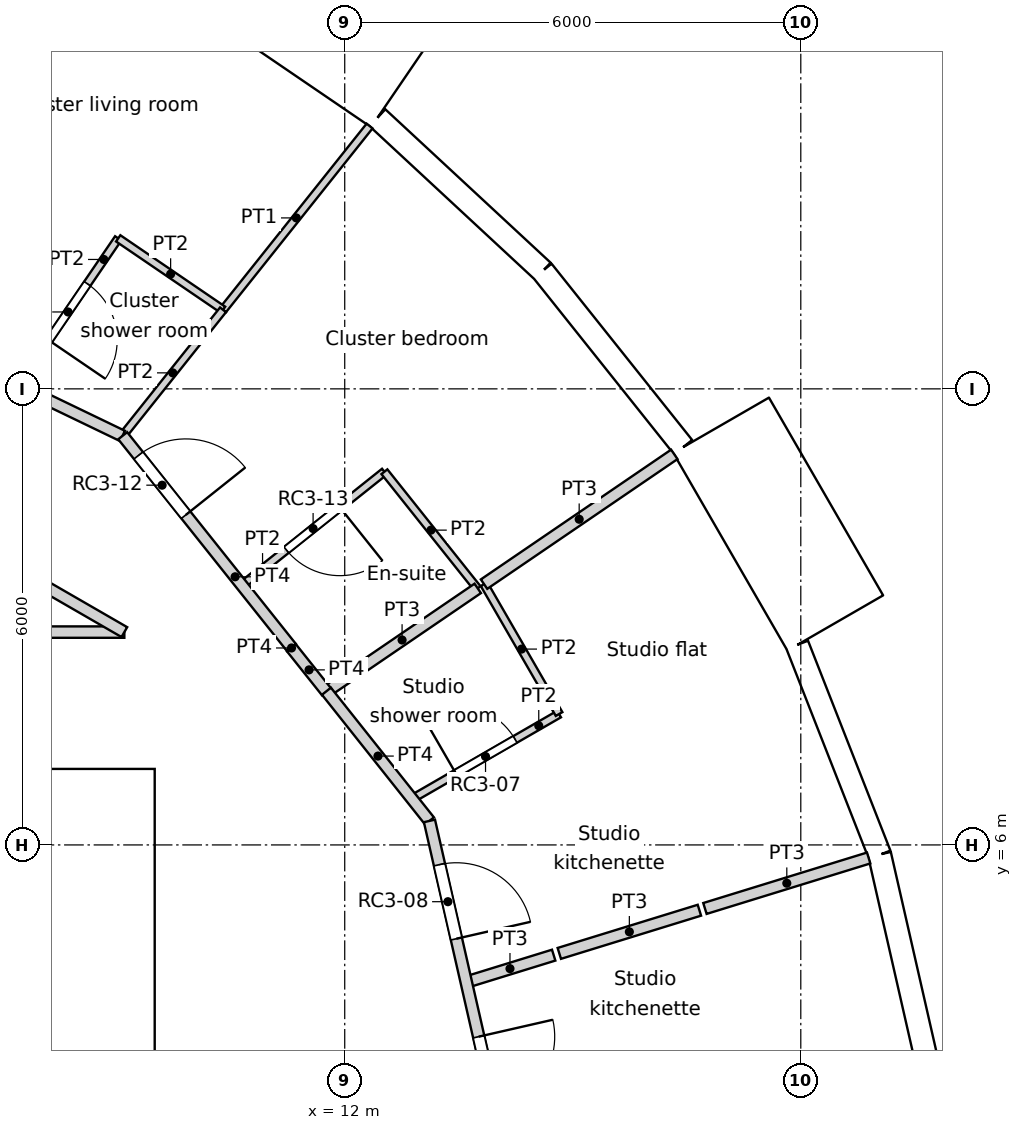
"""IFC4 building model, lengths in metres.
Left out: names, types, materials, properties, quantities, classifications, styles, units other than length and angle.
Written with IfcOpenShell. Run it as: python <this file> out.ifc"""

import sys

from ifc_helpers import new_model, si_unit, direction, frame, frame_2d, origin, origin_2d, place, context, subcontext, project, spatial, rectangle, circle, extrude, element, fill, save


model = new_model("IFC4")
c1 = context("Model", 3, precision=1e-05, world=origin(), true_north=direction((0.0, 1.0)))
c2 = subcontext(c1, "Body", "Model", "MODEL_VIEW")
j1 = project(units=[si_unit("LENGTHUNIT", "METRE"), si_unit("PLANEANGLEUNIT", "RADIAN")], contexts=[c1])
p1 = place(None, origin())
s1 = spatial("IfcSite", under=j1, at=p1, CompositionType="ELEMENT")
p2 = place(p1, origin())
s2 = spatial("IfcBuilding", under=s1, at=p2, CompositionType="ELEMENT")
p3 = place(p2, frame((0.0, 0.0, 252.6)))
s3 = spatial("IfcBuildingStorey", under=s2, at=p3, CompositionType="ELEMENT", Elevation=252.6)
for number, where, z_axis, x_axis in (
    (1, (17.986, 5.548, 0.0), (0.0, 0.0, 1.0), (1.0, 0.0, 0.0)),
    (2, (15.552, 10.603, 0.0), (0.0, 0.0, 1.0), (1.0, 0.0, 0.0)),
    (3, (11.735, 14.716, 0.0), (0.0, 0.0, 1.0), (1.0, 0.0, 0.0)),
):
    element("IfcColumn", number, at=place(p3, frame(where, z_axis=z_axis, x_axis=x_axis)), inside=s3, PredefinedType="COLUMN", context=c2, shape_type="SweptSolid", body=[
        extrude(circle(Radius=0.55, at=origin_2d()), origin(), (0.0, 0.0, 1.0), 3.6),
    ])
p4 = place(p3, frame((19.696, 2.984, 0.0), z_axis=(0.0, 0.0, 1.0), x_axis=(-0.222529389789, 0.974925982155, 0.0)))
e4 = element("IfcWall", 4, at=p4, inside=s3, PredefinedType="SOLIDWALL", context=c2, shape_type="SweptSolid", body=[
    extrude(rectangle(XDim=2.962, YDim=0.3, at=frame_2d((1.481, 0.0))), origin(), (0.0, 0.0, 1.0), 3.25),
])
p5 = place(p4, frame((1.481, 0.0, 1.55)))
e5 = element("IfcOpeningElement", 5, at=p5, cuts=e4, PredefinedType="OPENING", context=c2, shape_type="SweptSolid", body=[
    extrude(circle(Radius=0.9, at=origin_2d()), frame((0.0, 0.16, 0.0), z_axis=(0.0, -1.0, 0.0), x_axis=(1.0, 0.0, 0.0)), (0.0, 0.0, 1.0), 0.32),
])
p6 = place(p3, frame((19.037, 5.872, 0.0), z_axis=(0.0, 0.0, 1.0), x_axis=(-0.36530043032, 0.930889679612, 0.0)))
e6 = element("IfcWall", 6, at=p6, inside=s3, PredefinedType="SOLIDWALL", context=c2, shape_type="SweptSolid", body=[
    extrude(rectangle(XDim=2.962, YDim=0.3, at=frame_2d((1.481, 0.0))), origin(), (0.0, 0.0, 1.0), 3.25),
])
p7 = place(p6, frame((1.481, 0.0, 1.55)))
e7 = element("IfcOpeningElement", 7, at=p7, cuts=e6, PredefinedType="OPENING", context=c2, shape_type="SweptSolid", body=[
    extrude(circle(Radius=0.9, at=origin_2d()), frame((0.0, 0.16, 0.0), z_axis=(0.0, -1.0, 0.0), x_axis=(1.0, 0.0, 0.0)), (0.0, 0.0, 1.0), 0.32),
])
p8 = place(p3, frame((18.452, 8.921, -0.35), z_axis=(0.0, 0.0, 1.0), x_axis=(-0.499990139034, 0.866031096941, 0.0)))
e8 = element("IfcWall", 8, at=p8, inside=s3, PredefinedType="ELEMENTEDWALL", context=c2, shape_type="SweptSolid", body=[
    extrude(rectangle(XDim=3.0, YDim=1.45, at=frame_2d((1.5, 0.0))), origin(), (0.0, 0.0, 1.0), 3.6),
])
p9 = place(p8, frame((1.5, 0.0, 1.9)))
e9 = element("IfcOpeningElement", 9, at=p9, cuts=e8, PredefinedType="OPENING", context=c2, shape_type="SweptSolid", body=[
    extrude(circle(Radius=0.9, at=origin_2d()), frame((0.0, 0.735, 0.0), z_axis=(0.0, -1.0, 0.0), x_axis=(1.0, 0.0, 0.0)), (0.0, 0.0, 1.0), 1.47),
])
p10 = place(p3, frame((16.451, 11.234, 0.0), z_axis=(0.0, 0.0, 1.0), x_axis=(-0.623498236992, 0.781824755599, 0.0)))
e10 = element("IfcWall", 10, at=p10, inside=s3, PredefinedType="SOLIDWALL", context=c2, shape_type="SweptSolid", body=[
    extrude(rectangle(XDim=2.962, YDim=0.3, at=frame_2d((1.481, 0.0))), origin(), (0.0, 0.0, 1.0), 3.25),
])
p11 = place(p10, frame((1.481, 0.0, 1.55)))
e11 = element("IfcOpeningElement", 11, at=p11, cuts=e10, PredefinedType="OPENING", context=c2, shape_type="SweptSolid", body=[
    extrude(circle(Radius=0.9, at=origin_2d()), frame((0.0, 0.16, 0.0), z_axis=(0.0, -1.0, 0.0), x_axis=(1.0, 0.0, 0.0)), (0.0, 0.0, 1.0), 0.32),
])
p12 = place(p3, frame((14.604, 13.55, 0.0), z_axis=(0.0, 0.0, 1.0), x_axis=(-0.733066412643, 0.680157066165, 0.0)))
e12 = element("IfcWall", 12, at=p12, inside=s3, PredefinedType="SOLIDWALL", context=c2, shape_type="SweptSolid", body=[
    extrude(rectangle(XDim=2.962, YDim=0.3, at=frame_2d((1.481, 0.0))), origin(), (0.0, 0.0, 1.0), 3.25),
])
p13 = place(p12, frame((1.481, 0.0, 1.55)))
e13 = element("IfcOpeningElement", 13, at=p13, cuts=e12, PredefinedType="OPENING", context=c2, shape_type="SweptSolid", body=[
    extrude(circle(Radius=0.9, at=origin_2d()), frame((0.0, 0.16, 0.0), z_axis=(0.0, -1.0, 0.0), x_axis=(1.0, 0.0, 0.0)), (0.0, 0.0, 1.0), 0.32),
])
p14 = place(p3, frame((12.754, 16.044, -0.35), z_axis=(0.0, 0.0, 1.0), x_axis=(-0.826246281157, 0.563309047392, 0.0)))
e14 = element("IfcWall", 14, at=p14, inside=s3, PredefinedType="ELEMENTEDWALL", context=c2, shape_type="SweptSolid", body=[
    extrude(rectangle(XDim=3.0, YDim=1.45, at=frame_2d((1.5, 0.0))), origin(), (0.0, 0.0, 1.0), 3.6),
])
p15 = place(p14, frame((1.5, 0.0, 1.9)))
e15 = element("IfcOpeningElement", 15, at=p15, cuts=e14, PredefinedType="OPENING", context=c2, shape_type="SweptSolid", body=[
    extrude(circle(Radius=0.9, at=origin_2d()), frame((0.0, 0.735, 0.0), z_axis=(0.0, -1.0, 0.0), x_axis=(1.0, 0.0, 0.0)), (0.0, 0.0, 1.0), 1.47),
])
p16 = place(p3, frame((-9.5, 6.7, 0.0), z_axis=(0.0, 0.0, 1.0), x_axis=(1.0, 0.0, 0.0)))
e16 = element("IfcWall", 16, at=p16, inside=s3, PredefinedType="SOLIDWALL", context=c2, shape_type="SweptSolid", body=[
    extrude(rectangle(XDim=19.0, YDim=0.6, at=frame_2d((9.5, 0.0))), origin(), (0.0, 0.0, 1.0), 3.6),
])
p17 = place(p16, frame((5.35, 0.0, 0.0)))
e17 = element("IfcOpeningElement", 17, at=p17, cuts=e16, PredefinedType="OPENING", context=c2, shape_type="SweptSolid", body=[
    extrude(rectangle(XDim=1.7, YDim=2.1, at=frame_2d((0.85, 1.05))), frame((0.0, 0.3, 0.0), z_axis=(0.0, -1.0, 0.0), x_axis=(1.0, 0.0, 0.0)), (0.0, 0.0, 1.0), 0.6),
])
p18 = place(p3, frame((9.2, -6.4, 0.0), z_axis=(0.0, 0.0, 1.0), x_axis=(0.0, 1.0, 0.0)))
e18 = element("IfcWall", 18, at=p18, inside=s3, PredefinedType="SOLIDWALL", context=c2, shape_type="SweptSolid", body=[
    extrude(rectangle(XDim=12.8, YDim=0.6, at=frame_2d((6.4, 0.0))), origin(), (0.0, 0.0, 1.0), 3.6),
])
p19 = place(p18, frame((6.4, 0.0, 0.0)))
e19 = element("IfcOpeningElement", 19, at=p19, cuts=e18, PredefinedType="OPENING", context=c2, shape_type="SweptSolid", body=[
    extrude(rectangle(XDim=1.8, YDim=2.1, at=frame_2d((0.9, 1.05))), frame((0.0, 0.3, 0.0), z_axis=(0.0, -1.0, 0.0), x_axis=(1.0, 0.0, 0.0)), (0.0, 0.0, 1.0), 0.6),
])
p20 = place(p3, frame((0.896, 8.8, 0.0), z_axis=(0.0, 0.0, 1.0), x_axis=(1.0, 0.0, 0.0)))
e20 = element("IfcWall", 20, at=p20, inside=s3, PredefinedType="PARTITIONING", context=c2, shape_type="SweptSolid", body=[
    extrude(rectangle(XDim=8.205, YDim=0.15, at=frame_2d((4.102, 0.0))), origin(), (0.0, 0.0, 1.0), 3.25),
])
p21 = place(p20, frame((3.598, 0.0, 0.0)))
e21 = element("IfcOpeningElement", 21, at=p21, cuts=e20, PredefinedType="OPENING", context=c2, shape_type="SweptSolid", body=[
    extrude(rectangle(XDim=1.0, YDim=2.04, at=frame_2d((0.5, 1.02))), frame((0.0, 0.075, 0.0), z_axis=(0.0, -1.0, 0.0), x_axis=(1.0, 0.0, 0.0)), (0.0, 0.0, 1.0), 0.15),
])
p22 = place(p3, frame((9.079, 11.384, 0.0), z_axis=(0.0, 0.0, 1.0), x_axis=(0.623165080354, -0.782090328944, 0.0)))
e22 = element("IfcWall", 22, at=p22, inside=s3, PredefinedType="PARTITIONING", context=c2, shape_type="SweptSolid", body=[
    extrude(rectangle(XDim=3.564, YDim=0.15, at=frame_2d((1.782, 0.0))), origin(), (0.0, 0.0, 1.0), 3.25),
])
p23 = place(p22, frame((0.332, 0.0, 0.0)))
e23 = element("IfcOpeningElement", 23, at=p23, cuts=e22, PredefinedType="OPENING", context=c2, shape_type="SweptSolid", body=[
    extrude(rectangle(XDim=1.0, YDim=2.1, at=frame_2d((0.5, 1.05))), frame((0.0, 0.075, 0.0), z_axis=(0.0, -1.0, 0.0), x_axis=(1.0, 0.0, 0.0)), (0.0, 0.0, 1.0), 0.15),
])
p24 = place(p3, frame((11.3, 8.586, 0.0), z_axis=(0.0, 0.0, 1.0), x_axis=(0.0, 1.0, 0.0)))
e24 = element("IfcWall", 24, at=p24, inside=s3, PredefinedType="PARTITIONING", context=c2, shape_type="SweptSolid", body=[
    extrude(rectangle(XDim=0.01, YDim=0.15, at=frame_2d((0.005, 0.0))), origin(), (0.0, 0.0, 1.0), 3.25),
])
p25 = place(p3, frame((13.115, 6.316, 0.0), z_axis=(0.0, 0.0, 1.0), x_axis=(0.222568978642, -0.97491694505, 0.0)))
e25 = element("IfcWall", 25, at=p25, inside=s3, PredefinedType="PARTITIONING", context=c2, shape_type="SweptSolid", body=[
    extrude(rectangle(XDim=6.479, YDim=0.15, at=frame_2d((3.239, 0.0))), origin(), (0.0, 0.0, 1.0), 3.25),
])
p26 = place(p25, frame((2.911, 0.0, 0.0)))
e26 = element("IfcOpeningElement", 26, at=p26, cuts=e25, PredefinedType="OPENING", context=c2, shape_type="SweptSolid", body=[
    extrude(rectangle(XDim=1.0, YDim=2.1, at=frame_2d((0.5, 1.05))), frame((0.0, 0.075, 0.0), z_axis=(0.0, -1.0, 0.0), x_axis=(1.0, 0.0, 0.0)), (0.0, 0.0, 1.0), 0.15),
])
p27 = place(p25, frame((0.59, 0.0, 0.0)))
e27 = element("IfcOpeningElement", 27, at=p27, cuts=e25, PredefinedType="OPENING", context=c2, shape_type="SweptSolid", body=[
    extrude(rectangle(XDim=1.0, YDim=2.1, at=frame_2d((0.5, 1.05))), frame((0.0, 0.075, 0.0), z_axis=(0.0, -1.0, 0.0), x_axis=(1.0, 0.0, 0.0)), (0.0, 0.0, 1.0), 0.15),
])
p28 = place(p3, frame((11.76, 8.022, 0.0), z_axis=(0.0, 0.0, 1.0), x_axis=(0.62206805366, -0.782963177049, 0.0)))
e28 = element("IfcWall", 28, at=p28, inside=s3, PredefinedType="PARTITIONING", context=c2, shape_type="SweptSolid", body=[
    extrude(rectangle(XDim=2.179, YDim=0.15, at=frame_2d((1.089, 0.0))), origin(), (0.0, 0.0, 1.0), 3.25),
])
p29 = place(p3, frame((11.3, 8.592, 0.0), z_axis=(0.0, 0.0, 1.0), x_axis=(0.623405636383, -0.781898594785, 0.0)))
e29 = element("IfcWall", 29, at=p29, inside=s3, PredefinedType="PARTITIONING", context=c2, shape_type="SweptSolid", body=[
    extrude(rectangle(XDim=0.74, YDim=0.15, at=frame_2d((0.37, 0.0))), origin(), (0.0, 0.0, 1.0), 3.25),
])
p30 = place(p3, frame((3.261, 12.171, 0.0), z_axis=(0.0, 0.0, 1.0), x_axis=(0.866066809554, -0.499928276245, 0.0)))
e30 = element("IfcWall", 30, at=p30, inside=s3, PredefinedType="PARTITIONING", context=c2, shape_type="SweptSolid", body=[
    extrude(rectangle(XDim=6.743, YDim=0.15, at=frame_2d((3.371, 0.0))), origin(), (0.0, 0.0, 1.0), 3.25),
])
p31 = place(p3, frame((3.239, 14.192, 0.0), z_axis=(0.0, 0.0, 1.0), x_axis=(0.90093183072, -0.433960639224, 0.0)))
e31 = element("IfcWall", 31, at=p31, inside=s3, PredefinedType="PARTITIONING", context=c2, shape_type="SweptSolid", body=[
    extrude(rectangle(XDim=6.479, YDim=0.15, at=frame_2d((3.239, 0.0))), origin(), (0.0, 0.0, 1.0), 3.25),
])
p32 = place(p31, frame((3.013, 0.0, 0.0)))
e32 = element("IfcOpeningElement", 32, at=p32, cuts=e31, PredefinedType="OPENING", context=c2, shape_type="SweptSolid", body=[
    extrude(rectangle(XDim=1.1, YDim=2.1, at=frame_2d((0.55, 1.05))), frame((0.0, 0.075, 0.0), z_axis=(0.0, -1.0, 0.0), x_axis=(1.0, 0.0, 0.0)), (0.0, 0.0, 1.0), 0.15),
])
p33 = place(p3, frame((13.599, 4.195, 0.0), z_axis=(0.0, 0.0, 1.0), x_axis=(0.955506647746, 0.294969568115, 0.0)))
e33 = element("IfcWall", 33, at=p33, inside=s3, PredefinedType="PARTITIONING", context=c2, shape_type="SweptSolid", body=[
    extrude(rectangle(XDim=1.203, YDim=0.15, at=frame_2d((0.602, 0.0))), origin(), (0.0, 0.0, 1.0), 3.25),
])
p34 = place(p3, frame((16.739, 5.164, 0.0), z_axis=(0.0, 0.0, 1.0), x_axis=(0.955650111791, 0.294504437715, 0.0)))
e34 = element("IfcWall", 34, at=p34, inside=s3, PredefinedType="PARTITIONING", context=c2, shape_type="SweptSolid", body=[
    extrude(rectangle(XDim=2.254, YDim=0.15, at=frame_2d((1.127, 0.0))), origin(), (0.0, 0.0, 1.0), 3.25),
])
p35 = place(p3, frame((14.823, 4.573, 0.0), z_axis=(0.0, 0.0, 1.0), x_axis=(0.955628343972, 0.294575063773, 0.0)))
e35 = element("IfcWall", 35, at=p35, inside=s3, PredefinedType="PARTITIONING", context=c2, shape_type="SweptSolid", body=[
    extrude(rectangle(XDim=1.929, YDim=0.15, at=frame_2d((0.964, 0.0))), origin(), (0.0, 0.0, 1.0), 3.25),
])
p36 = place(p3, frame((12.885, 6.605, 0.0), z_axis=(0.0, 0.0, 1.0), x_axis=(0.866076416361, 0.499911633214, 0.0)))
e36 = element("IfcWall", 36, at=p36, inside=s3, PredefinedType="PARTITIONING", context=c2, shape_type="SweptSolid", body=[
    extrude(rectangle(XDim=2.234, YDim=0.1, at=frame_2d((1.117, 0.0))), origin(), (0.0, 0.0, 1.0), 3.25),
])
p37 = place(p36, frame((0.667, 0.0, 0.0)))
e37 = element("IfcOpeningElement", 37, at=p37, cuts=e36, PredefinedType="OPENING", context=c2, shape_type="SweptSolid", body=[
    extrude(rectangle(XDim=0.9, YDim=2.04, at=frame_2d((0.45, 1.02))), frame((0.0, 0.05, 0.0), z_axis=(0.0, -1.0, 0.0), x_axis=(1.0, 0.0, 0.0)), (0.0, 0.0, 1.0), 0.1),
])
p38 = place(p3, frame((13.833, 9.431, 0.0), z_axis=(0.0, 0.0, 1.0), x_axis=(0.500143626598, -0.865942465048, 0.0)))
e38 = element("IfcWall", 38, at=p38, inside=s3, PredefinedType="PARTITIONING", context=c2, shape_type="SweptSolid", body=[
    extrude(rectangle(XDim=1.974, YDim=0.1, at=frame_2d((0.987, 0.0))), origin(), (0.0, 0.0, 1.0), 3.25),
])
p39 = place(p3, frame((13.833, 9.431, 0.0), z_axis=(0.0, 0.0, 1.0), x_axis=(0.826152320289, 0.56344684193, 0.0)))
e39 = element("IfcWall", 39, at=p39, inside=s3, PredefinedType="PARTITIONING", context=c2, shape_type="SweptSolid", body=[
    extrude(rectangle(XDim=3.03, YDim=0.15, at=frame_2d((1.515, 0.0))), origin(), (0.0, 0.0, 1.0), 3.25),
])
p40 = place(p3, frame((11.759, 8.017, 0.0), z_axis=(0.0, 0.0, 1.0), x_axis=(0.826143746222, 0.563459413426, 0.0)))
e40 = element("IfcWall", 40, at=p40, inside=s3, PredefinedType="PARTITIONING", context=c2, shape_type="SweptSolid", body=[
    extrude(rectangle(XDim=2.41, YDim=0.15, at=frame_2d((1.205, 0.0))), origin(), (0.0, 0.0, 1.0), 3.25),
])
p41 = place(p3, frame((9.02, 13.98, 0.0), z_axis=(0.0, 0.0, 1.0), x_axis=(0.826289240924, -0.563246030021, 0.0)))
e41 = element("IfcWall", 41, at=p41, inside=s3, PredefinedType="PARTITIONING", context=c2, shape_type="SweptSolid", body=[
    extrude(rectangle(XDim=1.669, YDim=0.1, at=frame_2d((0.834, 0.0))), origin(), (0.0, 0.0, 1.0), 3.25),
])
p42 = place(p3, frame((7.7, 12.044, 0.0), z_axis=(0.0, 0.0, 1.0), x_axis=(0.563349756349, 0.826218525586, 0.0)))
e42 = element("IfcWall", 42, at=p42, inside=s3, PredefinedType="PARTITIONING", context=c2, shape_type="SweptSolid", body=[
    extrude(rectangle(XDim=2.343, YDim=0.1, at=frame_2d((1.172, 0.0))), origin(), (0.0, 0.0, 1.0), 3.25),
])
p43 = place(p42, frame((0.721, 0.0, 0.0)))
e43 = element("IfcOpeningElement", 43, at=p43, cuts=e42, PredefinedType="OPENING", context=c2, shape_type="SweptSolid", body=[
    extrude(rectangle(XDim=0.9, YDim=2.0, at=frame_2d((0.45, 1.0))), frame((0.0, 0.05, 0.0), z_axis=(0.0, -1.0, 0.0), x_axis=(1.0, 0.0, 0.0)), (0.0, 0.0, 1.0), 0.1),
])
p44 = place(p3, frame((10.399, 13.04, 0.0), z_axis=(0.0, 0.0, 1.0), x_axis=(0.62343302941, 0.781876753613, 0.0)))
e44 = element("IfcWall", 44, at=p44, inside=s3, PredefinedType="PARTITIONING", context=c2, shape_type="SweptSolid", body=[
    extrude(rectangle(XDim=3.093, YDim=0.1, at=frame_2d((1.546, 0.0))), origin(), (0.0, 0.0, 1.0), 3.25),
])
p45 = place(p3, frame((9.076, 11.381, 0.0), z_axis=(0.0, 0.0, 1.0), x_axis=(0.623501640025, 0.781822041699, 0.0)))
e45 = element("IfcWall", 45, at=p45, inside=s3, PredefinedType="PARTITIONING", context=c2, shape_type="SweptSolid", body=[
    extrude(rectangle(XDim=2.122, YDim=0.1, at=frame_2d((1.061, 0.0))), origin(), (0.0, 0.0, 1.0), 3.25),
])
p46 = place(p3, frame((12.522, 10.91, 0.0), z_axis=(0.0, 0.0, 1.0), x_axis=(0.623330716607, -0.781958322249, 0.0)))
e46 = element("IfcWall", 46, at=p46, inside=s3, PredefinedType="PARTITIONING", context=c2, shape_type="SweptSolid", body=[
    extrude(rectangle(XDim=1.965, YDim=0.1, at=frame_2d((0.983, 0.0))), origin(), (0.0, 0.0, 1.0), 3.25),
])
p47 = place(p3, frame((10.645, 9.413, 0.0), z_axis=(0.0, 0.0, 1.0), x_axis=(0.781830263661, 0.623491330191, 0.0)))
e47 = element("IfcWall", 47, at=p47, inside=s3, PredefinedType="PARTITIONING", context=c2, shape_type="SweptSolid", body=[
    extrude(rectangle(XDim=2.401, YDim=0.1, at=frame_2d((1.2, 0.0))), origin(), (0.0, 0.0, 1.0), 3.25),
])
p48 = place(p47, frame((0.751, 0.0, 0.0)))
e48 = element("IfcOpeningElement", 48, at=p48, cuts=e47, PredefinedType="OPENING", context=c2, shape_type="SweptSolid", body=[
    extrude(rectangle(XDim=0.9, YDim=2.04, at=frame_2d((0.45, 1.02))), frame((0.0, 0.05, 0.0), z_axis=(0.0, -1.0, 0.0), x_axis=(1.0, 0.0, 0.0)), (0.0, 0.0, 1.0), 0.1),
])
p49 = place(p5, origin())
e49 = element("IfcWindow", 49, at=p49, inside=s3, PartitioningType="SINGLE_PANEL", PredefinedType="WINDOW", context=c2, shape_type="SweptSolid", body=[
    extrude(circle(Radius=0.9, at=origin_2d()), frame((0.0, 0.12, 0.0), z_axis=(0.0, -1.0, 0.0), x_axis=(1.0, 0.0, 0.0)), (0.0, 0.0, 1.0), 0.1),
])
fill(e5, e49)
p50 = place(p7, origin())
e50 = element("IfcWindow", 50, at=p50, inside=s3, PartitioningType="SINGLE_PANEL", PredefinedType="WINDOW", context=c2, shape_type="SweptSolid", body=[
    extrude(circle(Radius=0.9, at=origin_2d()), frame((0.0, 0.12, 0.0), z_axis=(0.0, -1.0, 0.0), x_axis=(1.0, 0.0, 0.0)), (0.0, 0.0, 1.0), 0.1),
])
fill(e7, e50)
p51 = place(p9, origin())
e51 = element("IfcWindow", 51, at=p51, inside=s3, PartitioningType="SINGLE_PANEL", PredefinedType="WINDOW", context=c2, shape_type="SweptSolid", body=[
    extrude(circle(Radius=0.9, at=origin_2d()), frame((0.0, 0.695, 0.0), z_axis=(0.0, -1.0, 0.0), x_axis=(1.0, 0.0, 0.0)), (0.0, 0.0, 1.0), 0.1),
])
fill(e9, e51)
p52 = place(p11, origin())
e52 = element("IfcWindow", 52, at=p52, inside=s3, PartitioningType="SINGLE_PANEL", PredefinedType="WINDOW", context=c2, shape_type="SweptSolid", body=[
    extrude(circle(Radius=0.9, at=origin_2d()), frame((0.0, 0.12, 0.0), z_axis=(0.0, -1.0, 0.0), x_axis=(1.0, 0.0, 0.0)), (0.0, 0.0, 1.0), 0.1),
])
fill(e11, e52)
p53 = place(p13, origin())
e53 = element("IfcWindow", 53, at=p53, inside=s3, PartitioningType="SINGLE_PANEL", PredefinedType="WINDOW", context=c2, shape_type="SweptSolid", body=[
    extrude(circle(Radius=0.9, at=origin_2d()), frame((0.0, 0.12, 0.0), z_axis=(0.0, -1.0, 0.0), x_axis=(1.0, 0.0, 0.0)), (0.0, 0.0, 1.0), 0.1),
])
fill(e13, e53)
p54 = place(p15, origin())
e54 = element("IfcWindow", 54, at=p54, inside=s3, PartitioningType="SINGLE_PANEL", PredefinedType="WINDOW", context=c2, shape_type="SweptSolid", body=[
    extrude(circle(Radius=0.9, at=origin_2d()), frame((0.0, 0.695, 0.0), z_axis=(0.0, -1.0, 0.0), x_axis=(1.0, 0.0, 0.0)), (0.0, 0.0, 1.0), 0.1),
])
fill(e15, e54)
p55 = place(p26, origin())
e55 = element("IfcDoor", 55, at=p55, inside=s3, OperationType="SINGLE_SWING_LEFT", PredefinedType="DOOR", context=c2, shape_type="SweptSolid", body=[
    extrude(rectangle(XDim=1.0, YDim=2.1, at=frame_2d((0.5, 1.05))), frame((0.0, 0.025, 0.0), z_axis=(0.0, -1.0, 0.0), x_axis=(1.0, 0.0, 0.0)), (0.0, 0.0, 1.0), 0.05),
])
fill(e26, e55)
p56 = place(p37, origin())
e56 = element("IfcDoor", 56, at=p56, inside=s3, OperationType="SINGLE_SWING_LEFT", PredefinedType="DOOR", context=c2, shape_type="SweptSolid", body=[
    extrude(rectangle(XDim=0.9, YDim=2.04, at=frame_2d((0.45, 1.02))), frame((0.0, 0.025, 0.0), z_axis=(0.0, -1.0, 0.0), x_axis=(1.0, 0.0, 0.0)), (0.0, 0.0, 1.0), 0.05),
])
fill(e37, e56)
p57 = place(p27, origin())
e57 = element("IfcDoor", 57, at=p57, inside=s3, OperationType="SINGLE_SWING_RIGHT", PredefinedType="DOOR", context=c2, shape_type="SweptSolid", body=[
    extrude(rectangle(XDim=1.0, YDim=2.1, at=frame_2d((0.5, 1.05))), frame((0.0, 0.025, 0.0), z_axis=(0.0, -1.0, 0.0), x_axis=(1.0, 0.0, 0.0)), (0.0, 0.0, 1.0), 0.05),
])
fill(e27, e57)
p58 = place(p43, origin())
e58 = element("IfcDoor", 58, at=p58, inside=s3, OperationType="SINGLE_SWING_RIGHT", PredefinedType="DOOR", context=c2, shape_type="SweptSolid", body=[
    extrude(rectangle(XDim=0.9, YDim=2.0, at=frame_2d((0.45, 1.0))), frame((0.0, 0.025, 0.0), z_axis=(0.0, -1.0, 0.0), x_axis=(1.0, 0.0, 0.0)), (0.0, 0.0, 1.0), 0.05),
])
fill(e43, e58)
p59 = place(p23, origin())
e59 = element("IfcDoor", 59, at=p59, inside=s3, OperationType="SINGLE_SWING_RIGHT", PredefinedType="DOOR", context=c2, shape_type="SweptSolid", body=[
    extrude(rectangle(XDim=1.0, YDim=2.1, at=frame_2d((0.5, 1.05))), frame((0.0, 0.025, 0.0), z_axis=(0.0, -1.0, 0.0), x_axis=(1.0, 0.0, 0.0)), (0.0, 0.0, 1.0), 0.05),
])
fill(e23, e59)
p60 = place(p48, origin())
e60 = element("IfcDoor", 60, at=p60, inside=s3, OperationType="SINGLE_SWING_LEFT", PredefinedType="DOOR", context=c2, shape_type="SweptSolid", body=[
    extrude(rectangle(XDim=0.9, YDim=2.04, at=frame_2d((0.45, 1.02))), frame((0.0, 0.025, 0.0), z_axis=(0.0, -1.0, 0.0), x_axis=(1.0, 0.0, 0.0)), (0.0, 0.0, 1.0), 0.05),
])
fill(e48, e60)
save(model, sys.argv[1])
